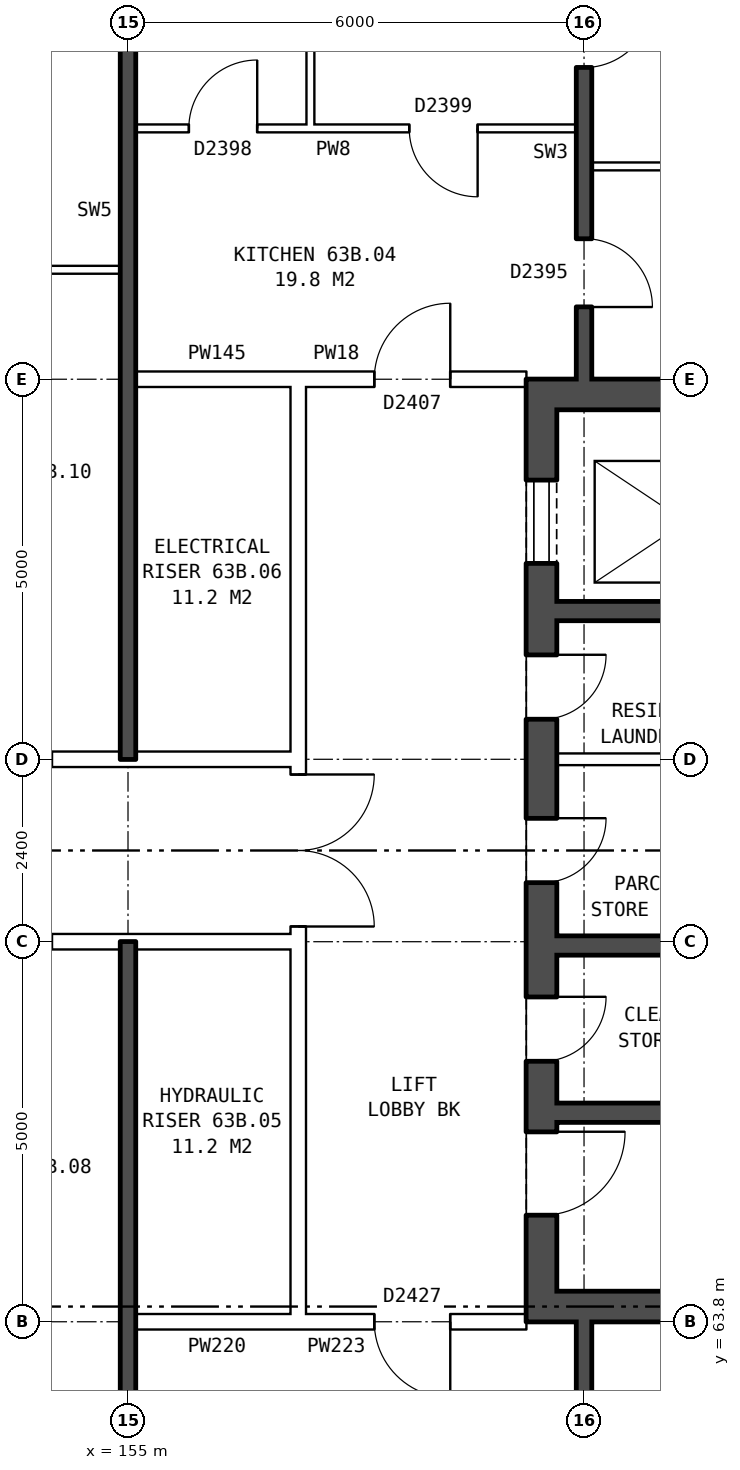
"""IFC4 building model, lengths in metres.
Left out: names, types, materials, properties, quantities, classifications, styles, units other than length and angle.
Written with IfcOpenShell. Run it as: python <this file> out.ifc"""

import sys

from ifc_helpers import new_model, si_unit, direction, frame, frame_2d, origin, place, context, subcontext, project, spatial, rectangle, extrude, element, fill, save


model = new_model("IFC4")
c1 = context("Model", 3, precision=1e-05, world=origin(), true_north=direction((0.0, 1.0)))
c2 = subcontext(c1, "Body", "Model", "MODEL_VIEW")
j1 = project(units=[si_unit("LENGTHUNIT", "METRE"), si_unit("PLANEANGLEUNIT", "RADIAN")], contexts=[c1])
p1 = place(None, origin())
s1 = spatial("IfcSite", under=j1, at=p1, CompositionType="ELEMENT")
p2 = place(p1, origin())
s2 = spatial("IfcBuilding", under=s1, at=p2, CompositionType="ELEMENT")
p3 = place(p2, frame((0.0, 0.0, 224.5)))
s3 = spatial("IfcBuildingStorey", under=s2, at=p3, CompositionType="ELEMENT", Elevation=224.5)
p4 = place(p3, frame((160.44, 76.2, 0.0), z_axis=(0.0, 0.0, 1.0), x_axis=(0.0, -1.0, 0.0)))
e1 = element("IfcWall", 1, at=p4, inside=s3, PredefinedType="SHEAR", context=c2, shape_type="SweptSolid", body=[
    extrude(rectangle(XDim=12.4, YDim=0.4, at=frame_2d((6.2, 0.0))), origin(), (0.0, 0.0, 1.0), 2.85),
])
p5 = place(p4, frame((1.325, 0.0, 0.0)))
e2 = element("IfcOpeningElement", 2, at=p5, cuts=e1, PredefinedType="OPENING", context=c2, shape_type="SweptSolid", body=[
    extrude(rectangle(XDim=1.1, YDim=2.1, at=frame_2d((0.55, 1.05))), frame((0.0, 0.21, 0.0), z_axis=(0.0, -1.0, 0.0), x_axis=(1.0, 0.0, 0.0)), (0.0, 0.0, 1.0), 0.42),
])
p6 = place(p4, frame((3.625, 0.0, 0.0)))
e3 = element("IfcOpeningElement", 3, at=p6, cuts=e1, PredefinedType="OPENING", context=c2, shape_type="SweptSolid", body=[
    extrude(rectangle(XDim=0.85, YDim=2.1, at=frame_2d((0.425, 1.05))), frame((0.0, 0.21, 0.0), z_axis=(0.0, -1.0, 0.0), x_axis=(1.0, 0.0, 0.0)), (0.0, 0.0, 1.0), 0.42),
])
p7 = place(p4, frame((5.775, 0.0, 0.0)))
e4 = element("IfcOpeningElement", 4, at=p7, cuts=e1, PredefinedType="OPENING", context=c2, shape_type="SweptSolid", body=[
    extrude(rectangle(XDim=0.85, YDim=2.1, at=frame_2d((0.425, 1.05))), frame((0.0, 0.21, 0.0), z_axis=(0.0, -1.0, 0.0), x_axis=(1.0, 0.0, 0.0)), (0.0, 0.0, 1.0), 0.42),
])
p8 = place(p4, frame((9.9, 0.0, 0.0)))
e5 = element("IfcOpeningElement", 5, at=p8, cuts=e1, PredefinedType="OPENING", context=c2, shape_type="SweptSolid", body=[
    extrude(rectangle(XDim=1.1, YDim=2.1, at=frame_2d((0.55, 1.05))), frame((0.0, 0.21, 0.0), z_axis=(0.0, -1.0, 0.0), x_axis=(1.0, 0.0, 0.0)), (0.0, 0.0, 1.0), 0.42),
])
p9 = place(p4, frame((8.125, 0.0, 0.0)))
e6 = element("IfcOpeningElement", 6, at=p9, cuts=e1, PredefinedType="OPENING", context=c2, shape_type="SweptSolid", body=[
    extrude(rectangle(XDim=0.85, YDim=2.1, at=frame_2d((0.425, 1.05))), frame((0.0, 0.21, 0.0), z_axis=(0.0, -1.0, 0.0), x_axis=(1.0, 0.0, 0.0)), (0.0, 0.0, 1.0), 0.42),
])
for number, where, z_axis, x_axis in (
    (7, (160.64, 76.0, 0.0), (0.0, 0.0, 1.0), (1.0, 0.0, 0.0)),
    (8, (160.64, 64.0, 0.0), (0.0, 0.0, 1.0), (1.0, 0.0, 0.0)),
):
    element("IfcWall", number, at=place(p3, frame(where, z_axis=z_axis, x_axis=x_axis)), inside=s3, PredefinedType="SHEAR", context=c2, shape_type="SweptSolid", body=[
        extrude(rectangle(XDim=7.6, YDim=0.4, at=frame_2d((3.8, 0.0))), origin(), (0.0, 0.0, 1.0), 2.85),
    ])
p10 = place(p3, frame((160.64, 73.15, 0.0), z_axis=(0.0, 0.0, 1.0), x_axis=(1.0, 0.0, 0.0)))
e9 = element("IfcWall", 9, at=p10, inside=s3, PredefinedType="SHEAR", context=c2, shape_type="SweptSolid", body=[
    extrude(rectangle(XDim=4.775, YDim=0.25, at=frame_2d((2.388, 0.0))), origin(), (0.0, 0.0, 1.0), 2.85),
])
p11 = place(p3, frame((160.64, 71.2, 0.0), z_axis=(0.0, 0.0, 1.0), x_axis=(1.0, 0.0, 0.0)))
e10 = element("IfcWall", 10, at=p11, inside=s3, PredefinedType="PARTITIONING", context=c2, shape_type="SweptSolid", body=[
    extrude(rectangle(XDim=2.525, YDim=0.15, at=frame_2d((1.263, 0.0))), origin(), (0.0, 0.0, 1.0), 2.85),
])
p12 = place(p3, frame((160.64, 68.75, 0.0), z_axis=(0.0, 0.0, 1.0), x_axis=(1.0, 0.0, 0.0)))
e11 = element("IfcWall", 11, at=p12, inside=s3, PredefinedType="SHEAR", context=c2, shape_type="SweptSolid", body=[
    extrude(rectangle(XDim=7.6, YDim=0.25, at=frame_2d((3.8, 0.0))), origin(), (0.0, 0.0, 1.0), 2.85),
])
p13 = place(p12, frame((5.175, 0.0, 0.0)))
e12 = element("IfcOpeningElement", 12, at=p13, cuts=e11, PredefinedType="OPENING", context=c2, shape_type="SweptSolid", body=[
    extrude(rectangle(XDim=1.1, YDim=2.1, at=frame_2d((0.55, 1.05))), frame((0.0, 0.135, 0.0), z_axis=(0.0, -1.0, 0.0), x_axis=(1.0, 0.0, 0.0)), (0.0, 0.0, 1.0), 0.27),
])
p14 = place(p12, frame((3.35, 0.0, 0.0)))
e13 = element("IfcOpeningElement", 13, at=p14, cuts=e11, PredefinedType="OPENING", context=c2, shape_type="SweptSolid", body=[
    extrude(rectangle(XDim=0.85, YDim=2.1, at=frame_2d((0.425, 1.05))), frame((0.0, 0.135, 0.0), z_axis=(0.0, -1.0, 0.0), x_axis=(1.0, 0.0, 0.0)), (0.0, 0.0, 1.0), 0.27),
])
p15 = place(p3, frame((160.64, 66.55, 0.0), z_axis=(0.0, 0.0, 1.0), x_axis=(1.0, 0.0, 0.0)))
e14 = element("IfcWall", 14, at=p15, inside=s3, PredefinedType="SHEAR", context=c2, shape_type="SweptSolid", body=[
    extrude(rectangle(XDim=2.525, YDim=0.25, at=frame_2d((1.263, 0.0))), origin(), (0.0, 0.0, 1.0), 2.85),
])
p16 = place(p3, frame((157.24, 63.9, 0.0), z_axis=(0.0, 0.0, 1.0), x_axis=(0.0, 1.0, 0.0)))
e15 = element("IfcWall", 15, at=p16, inside=s3, PredefinedType="PARTITIONING", context=c2, shape_type="SweptSolid", body=[
    extrude(rectangle(XDim=12.2, YDim=0.2, at=frame_2d((6.1, 0.0))), origin(), (0.0, 0.0, 1.0), 2.85),
])
p17 = place(p16, frame((5.1, 0.0, 0.0)))
e16 = element("IfcOpeningElement", 16, at=p17, cuts=e15, PredefinedType="OPENING", context=c2, shape_type="SweptSolid", body=[
    extrude(rectangle(XDim=2.0, YDim=2.1, at=frame_2d((1.0, 1.05))), frame((0.0, 0.11, 0.0), z_axis=(0.0, -1.0, 0.0), x_axis=(1.0, 0.0, 0.0)), (0.0, 0.0, 1.0), 0.22),
])
p18 = place(p3, frame((155.1, 63.8, 0.0), z_axis=(0.0, 0.0, 1.0), x_axis=(1.0, 0.0, 0.0)))
e17 = element("IfcWall", 17, at=p18, inside=s3, PredefinedType="PARTITIONING", context=c2, shape_type="SweptSolid", body=[
    extrude(rectangle(XDim=2.14, YDim=0.2, at=frame_2d((1.07, 0.0))), origin(), (0.0, 0.0, 1.0), 2.85),
])
p19 = place(p3, frame((157.24, 63.8, 0.0), z_axis=(0.0, 0.0, 1.0), x_axis=(1.0, 0.0, 0.0)))
e18 = element("IfcWall", 18, at=p19, inside=s3, PredefinedType="PARTITIONING", context=c2, shape_type="SweptSolid", body=[
    extrude(rectangle(XDim=3.0, YDim=0.2, at=frame_2d((1.5, 0.0))), origin(), (0.0, 0.0, 1.0), 2.85),
])
p20 = place(p19, frame((1.0, 0.0, 0.0)))
e19 = element("IfcOpeningElement", 19, at=p20, cuts=e18, PredefinedType="OPENING", context=c2, shape_type="SweptSolid", body=[
    extrude(rectangle(XDim=1.0, YDim=2.1, at=frame_2d((0.5, 1.05))), frame((0.0, 0.11, 0.0), z_axis=(0.0, -1.0, 0.0), x_axis=(1.0, 0.0, 0.0)), (0.0, 0.0, 1.0), 0.22),
])
p21 = place(p3, frame((142.76, 68.8, 0.0), z_axis=(0.0, 0.0, 1.0), x_axis=(1.0, 0.0, 0.0)))
e20 = element("IfcWall", 20, at=p21, inside=s3, PredefinedType="PARTITIONING", context=c2, shape_type="SweptSolid", body=[
    extrude(rectangle(XDim=14.48, YDim=0.2, at=frame_2d((7.24, 0.0))), origin(), (0.0, 0.0, 1.0), 2.85),
])
p22 = place(p21, frame((1.12, 0.0, 0.0)))
e21 = element("IfcOpeningElement", 21, at=p22, cuts=e20, PredefinedType="OPENING", context=c2, shape_type="SweptSolid", body=[
    extrude(rectangle(XDim=1.0, YDim=2.1, at=frame_2d((0.5, 1.05))), frame((0.0, 0.11, 0.0), z_axis=(0.0, -1.0, 0.0), x_axis=(1.0, 0.0, 0.0)), (0.0, 0.0, 1.0), 0.22),
])
p23 = place(p21, frame((10.24, 0.0, 0.0)))
e22 = element("IfcOpeningElement", 22, at=p23, cuts=e20, PredefinedType="OPENING", context=c2, shape_type="SweptSolid", body=[
    extrude(rectangle(XDim=1.0, YDim=2.1, at=frame_2d((0.5, 1.05))), frame((0.0, 0.11, 0.0), z_axis=(0.0, -1.0, 0.0), x_axis=(1.0, 0.0, 0.0)), (0.0, 0.0, 1.0), 0.22),
])
p24 = place(p3, frame((142.76, 71.2, 0.0), z_axis=(0.0, 0.0, 1.0), x_axis=(1.0, 0.0, 0.0)))
e23 = element("IfcWall", 23, at=p24, inside=s3, PredefinedType="PARTITIONING", context=c2, shape_type="SweptSolid", body=[
    extrude(rectangle(XDim=14.48, YDim=0.2, at=frame_2d((7.24, 0.0))), origin(), (0.0, 0.0, 1.0), 2.85),
])
p25 = place(p24, frame((4.24, 0.0, 0.0)))
e24 = element("IfcOpeningElement", 24, at=p25, cuts=e23, PredefinedType="OPENING", context=c2, shape_type="SweptSolid", body=[
    extrude(rectangle(XDim=1.0, YDim=2.1, at=frame_2d((0.5, 1.05))), frame((0.0, 0.11, 0.0), z_axis=(0.0, -1.0, 0.0), x_axis=(1.0, 0.0, 0.0)), (0.0, 0.0, 1.0), 0.22),
])
p26 = place(p24, frame((10.24, 0.0, 0.0)))
e25 = element("IfcOpeningElement", 25, at=p26, cuts=e23, PredefinedType="OPENING", context=c2, shape_type="SweptSolid", body=[
    extrude(rectangle(XDim=1.0, YDim=2.1, at=frame_2d((0.5, 1.05))), frame((0.0, 0.11, 0.0), z_axis=(0.0, -1.0, 0.0), x_axis=(1.0, 0.0, 0.0)), (0.0, 0.0, 1.0), 0.22),
])
p27 = place(p3, frame((155.1, 76.2, 0.0), z_axis=(0.0, 0.0, 1.0), x_axis=(1.0, 0.0, 0.0)))
e26 = element("IfcWall", 26, at=p27, inside=s3, PredefinedType="PARTITIONING", context=c2, shape_type="SweptSolid", body=[
    extrude(rectangle(XDim=2.14, YDim=0.2, at=frame_2d((1.07, 0.0))), origin(), (0.0, 0.0, 1.0), 2.85),
])
p28 = place(p3, frame((157.24, 76.2, 0.0), z_axis=(0.0, 0.0, 1.0), x_axis=(1.0, 0.0, 0.0)))
e27 = element("IfcWall", 27, at=p28, inside=s3, PredefinedType="PARTITIONING", context=c2, shape_type="SweptSolid", body=[
    extrude(rectangle(XDim=3.0, YDim=0.2, at=frame_2d((1.5, 0.0))), origin(), (0.0, 0.0, 1.0), 2.85),
])
p29 = place(p28, frame((1.0, 0.0, 0.0)))
e28 = element("IfcOpeningElement", 28, at=p29, cuts=e27, PredefinedType="OPENING", context=c2, shape_type="SweptSolid", body=[
    extrude(rectangle(XDim=1.0, YDim=2.1, at=frame_2d((0.5, 1.05))), frame((0.0, 0.11, 0.0), z_axis=(0.0, -1.0, 0.0), x_axis=(1.0, 0.0, 0.0)), (0.0, 0.0, 1.0), 0.22),
])
p30 = place(p3, frame((152.0, 77.64, 0.0), z_axis=(0.0, 0.0, 1.0), x_axis=(1.0, 0.0, 0.0)))
e29 = element("IfcWall", 29, at=p30, inside=s3, PredefinedType="PARTITIONING", context=c2, shape_type="SweptSolid", body=[
    extrude(rectangle(XDim=2.9, YDim=0.1, at=frame_2d((1.45, 0.0))), origin(), (0.0, 0.0, 1.0), 2.85),
])
p31 = place(p30, frame((1.0, 0.0, 0.0)))
e30 = element("IfcOpeningElement", 30, at=p31, cuts=e29, PredefinedType="OPENING", context=c2, shape_type="SweptSolid", body=[
    extrude(rectangle(XDim=0.9, YDim=2.1, at=frame_2d((0.45, 1.05))), frame((0.0, 0.06, 0.0), z_axis=(0.0, -1.0, 0.0), x_axis=(1.0, 0.0, 0.0)), (0.0, 0.0, 1.0), 0.12),
])
p32 = place(p3, frame((161.1, 79.0, 0.0), z_axis=(0.0, 0.0, 1.0), x_axis=(1.0, 0.0, 0.0)))
e31 = element("IfcWall", 31, at=p32, inside=s3, PredefinedType="PARTITIONING", context=c2, shape_type="SweptSolid", body=[
    extrude(rectangle(XDim=7.54, YDim=0.1, at=frame_2d((3.77, 0.0))), origin(), (0.0, 0.0, 1.0), 2.85),
])
p33 = place(p3, frame((155.1, 79.5, 0.0), z_axis=(0.0, 0.0, 1.0), x_axis=(1.0, 0.0, 0.0)))
e32 = element("IfcWall", 32, at=p33, inside=s3, PredefinedType="PARTITIONING", context=c2, shape_type="SweptSolid", body=[
    extrude(rectangle(XDim=5.8, YDim=0.1, at=frame_2d((2.9, 0.0))), origin(), (0.0, 0.0, 1.0), 2.85),
])
p34 = place(p33, frame((3.6, 0.0, 0.0)))
e33 = element("IfcOpeningElement", 33, at=p34, cuts=e32, PredefinedType="OPENING", context=c2, shape_type="SweptSolid", body=[
    extrude(rectangle(XDim=0.9, YDim=2.1, at=frame_2d((0.45, 1.05))), frame((0.0, 0.06, 0.0), z_axis=(0.0, -1.0, 0.0), x_axis=(1.0, 0.0, 0.0)), (0.0, 0.0, 1.0), 0.12),
])
p35 = place(p33, frame((0.7, 0.0, 0.0)))
e34 = element("IfcOpeningElement", 34, at=p35, cuts=e32, PredefinedType="OPENING", context=c2, shape_type="SweptSolid", body=[
    extrude(rectangle(XDim=0.9, YDim=2.1, at=frame_2d((0.45, 1.05))), frame((0.0, 0.06, 0.0), z_axis=(0.0, -1.0, 0.0), x_axis=(1.0, 0.0, 0.0)), (0.0, 0.0, 1.0), 0.12),
])
for number, where, z_axis, x_axis in (
    (35, (155.0, 54.36, 0.0), (0.0, 0.0, 1.0), (0.0, 1.0, 0.0)),
    (36, (155.0, 71.2, 0.0), (0.0, 0.0, 1.0), (0.0, 1.0, 0.0)),
):
    element("IfcWall", number, at=place(p3, frame(where, z_axis=z_axis, x_axis=x_axis)), inside=s3, PredefinedType="SOLIDWALL", context=c2, shape_type="SweptSolid", body=[
        extrude(rectangle(XDim=14.44, YDim=0.2, at=frame_2d((7.22, 0.0))), origin(), (0.0, 0.0, 1.0), 2.85),
    ])
p36 = place(p3, frame((157.4, 79.55, 0.0), z_axis=(0.0, 0.0, 1.0), x_axis=(0.0, 1.0, 0.0)))
e37 = element("IfcWall", 37, at=p36, inside=s3, PredefinedType="PARTITIONING", context=c2, shape_type="SweptSolid", body=[
    extrude(rectangle(XDim=2.7, YDim=0.1, at=frame_2d((1.35, 0.0))), origin(), (0.0, 0.0, 1.0), 2.85),
])
p37 = place(p3, frame((161.0, 54.36, 0.0), z_axis=(0.0, 0.0, 1.0), x_axis=(0.0, 1.0, 0.0)))
e38 = element("IfcWall", 38, at=p37, inside=s3, PredefinedType="SOLIDWALL", context=c2, shape_type="SweptSolid", body=[
    extrude(rectangle(XDim=9.44, YDim=0.2, at=frame_2d((4.72, 0.0))), origin(), (0.0, 0.0, 1.0), 2.85),
])
p38 = place(p37, frame((1.37, 0.0, 0.0)))
e39 = element("IfcOpeningElement", 39, at=p38, cuts=e38, PredefinedType="OPENING", context=c2, shape_type="SweptSolid", body=[
    extrude(rectangle(XDim=0.9, YDim=2.1, at=frame_2d((0.45, 1.05))), frame((0.0, 0.11, 0.0), z_axis=(0.0, -1.0, 0.0), x_axis=(1.0, 0.0, 0.0)), (0.0, 0.0, 1.0), 0.22),
])
p39 = place(p37, frame((4.14, 0.0, 0.0)))
e40 = element("IfcOpeningElement", 40, at=p39, cuts=e38, PredefinedType="OPENING", context=c2, shape_type="SweptSolid", body=[
    extrude(rectangle(XDim=0.9, YDim=2.1, at=frame_2d((0.45, 1.05))), frame((0.0, 0.11, 0.0), z_axis=(0.0, -1.0, 0.0), x_axis=(1.0, 0.0, 0.0)), (0.0, 0.0, 1.0), 0.22),
])
p40 = place(p37, frame((7.59, 0.0, 0.0)))
e41 = element("IfcOpeningElement", 41, at=p40, cuts=e38, PredefinedType="OPENING", context=c2, shape_type="SweptSolid", body=[
    extrude(rectangle(XDim=0.9, YDim=2.1, at=frame_2d((0.45, 1.05))), frame((0.0, 0.11, 0.0), z_axis=(0.0, -1.0, 0.0), x_axis=(1.0, 0.0, 0.0)), (0.0, 0.0, 1.0), 0.22),
])
p41 = place(p3, frame((161.0, 76.2, 0.0), z_axis=(0.0, 0.0, 1.0), x_axis=(0.0, 1.0, 0.0)))
e42 = element("IfcWall", 42, at=p41, inside=s3, PredefinedType="SOLIDWALL", context=c2, shape_type="SweptSolid", body=[
    extrude(rectangle(XDim=9.44, YDim=0.2, at=frame_2d((4.72, 0.0))), origin(), (0.0, 0.0, 1.0), 2.85),
])
p42 = place(p41, frame((7.17, 0.0, 0.0)))
e43 = element("IfcOpeningElement", 43, at=p42, cuts=e42, PredefinedType="OPENING", context=c2, shape_type="SweptSolid", body=[
    extrude(rectangle(XDim=0.9, YDim=2.1, at=frame_2d((0.45, 1.05))), frame((0.0, 0.11, 0.0), z_axis=(0.0, -1.0, 0.0), x_axis=(1.0, 0.0, 0.0)), (0.0, 0.0, 1.0), 0.22),
])
p43 = place(p41, frame((4.1, 0.0, 0.0)))
e44 = element("IfcOpeningElement", 44, at=p43, cuts=e42, PredefinedType="OPENING", context=c2, shape_type="SweptSolid", body=[
    extrude(rectangle(XDim=0.9, YDim=2.1, at=frame_2d((0.45, 1.05))), frame((0.0, 0.11, 0.0), z_axis=(0.0, -1.0, 0.0), x_axis=(1.0, 0.0, 0.0)), (0.0, 0.0, 1.0), 0.22),
])
p44 = place(p41, frame((0.95, 0.0, 0.0)))
e45 = element("IfcOpeningElement", 45, at=p44, cuts=e42, PredefinedType="OPENING", context=c2, shape_type="SweptSolid", body=[
    extrude(rectangle(XDim=0.9, YDim=2.1, at=frame_2d((0.45, 1.05))), frame((0.0, 0.11, 0.0), z_axis=(0.0, -1.0, 0.0), x_axis=(1.0, 0.0, 0.0)), (0.0, 0.0, 1.0), 0.22),
])
p45 = place(p5, origin())
e46 = element("IfcDoor", 46, at=p45, inside=s3, OperationType="DOUBLE_DOOR_SLIDING", PredefinedType="DOOR", context=c2, shape_type="SweptSolid", body=[
    extrude(rectangle(XDim=1.1, YDim=2.1, at=frame_2d((0.55, 1.05))), frame((0.0, 0.185, 0.0), z_axis=(0.0, -1.0, 0.0), x_axis=(1.0, 0.0, 0.0)), (0.0, 0.0, 1.0), 0.05),
])
fill(e2, e46)
p46 = place(p6, origin())
e47 = element("IfcDoor", 47, at=p46, inside=s3, OperationType="SINGLE_SWING_LEFT", PredefinedType="DOOR", context=c2, shape_type="SweptSolid", body=[
    extrude(rectangle(XDim=0.85, YDim=2.1, at=frame_2d((0.425, 1.05))), frame((0.0, 0.185, 0.0), z_axis=(0.0, -1.0, 0.0), x_axis=(1.0, 0.0, 0.0)), (0.0, 0.0, 1.0), 0.05),
])
fill(e3, e47)
p47 = place(p7, origin())
e48 = element("IfcDoor", 48, at=p47, inside=s3, OperationType="SINGLE_SWING_LEFT", PredefinedType="DOOR", context=c2, shape_type="SweptSolid", body=[
    extrude(rectangle(XDim=0.85, YDim=2.1, at=frame_2d((0.425, 1.05))), frame((0.0, 0.185, 0.0), z_axis=(0.0, -1.0, 0.0), x_axis=(1.0, 0.0, 0.0)), (0.0, 0.0, 1.0), 0.05),
])
fill(e4, e48)
p48 = place(p8, origin())
e49 = element("IfcDoor", 49, at=p48, inside=s3, OperationType="SINGLE_SWING_LEFT", PredefinedType="DOOR", context=c2, shape_type="SweptSolid", body=[
    extrude(rectangle(XDim=1.1, YDim=2.1, at=frame_2d((0.55, 1.05))), frame((0.0, 0.185, 0.0), z_axis=(0.0, -1.0, 0.0), x_axis=(1.0, 0.0, 0.0)), (0.0, 0.0, 1.0), 0.05),
])
fill(e5, e49)
p49 = place(p9, origin())
e50 = element("IfcDoor", 50, at=p49, inside=s3, OperationType="SINGLE_SWING_LEFT", PredefinedType="DOOR", context=c2, shape_type="SweptSolid", body=[
    extrude(rectangle(XDim=0.85, YDim=2.1, at=frame_2d((0.425, 1.05))), frame((0.0, 0.185, 0.0), z_axis=(0.0, -1.0, 0.0), x_axis=(1.0, 0.0, 0.0)), (0.0, 0.0, 1.0), 0.05),
])
fill(e6, e50)
p50 = place(p17, frame((2.0, 0.0, 0.0), z_axis=(0.0, 0.0, 1.0), x_axis=(-1.0, 0.0, 0.0)))
e51 = element("IfcDoor", 51, at=p50, inside=s3, OperationType="DOUBLE_DOOR_SINGLE_SWING", PredefinedType="DOOR", context=c2, shape_type="SweptSolid", body=[
    extrude(rectangle(XDim=2.0, YDim=2.1, at=frame_2d((1.0, 1.05))), frame((0.0, 0.025, 0.0), z_axis=(0.0, -1.0, 0.0), x_axis=(1.0, 0.0, 0.0)), (0.0, 0.0, 1.0), 0.05),
])
fill(e16, e51)
p51 = place(p20, frame((1.0, 0.0, 0.0), z_axis=(0.0, 0.0, 1.0), x_axis=(-1.0, 0.0, 0.0)))
e52 = element("IfcDoor", 52, at=p51, inside=s3, OperationType="SINGLE_SWING_LEFT", PredefinedType="DOOR", context=c2, shape_type="SweptSolid", body=[
    extrude(rectangle(XDim=1.0, YDim=2.1, at=frame_2d((0.5, 1.05))), frame((0.0, 0.025, 0.0), z_axis=(0.0, -1.0, 0.0), x_axis=(1.0, 0.0, 0.0)), (0.0, 0.0, 1.0), 0.05),
])
fill(e19, e52)
p52 = place(p43, frame((0.9, 0.0, 0.0), z_axis=(0.0, 0.0, 1.0), x_axis=(-1.0, 0.0, 0.0)))
e53 = element("IfcDoor", 53, at=p52, inside=s3, OperationType="SINGLE_SWING_LEFT", PredefinedType="DOOR", context=c2, shape_type="SweptSolid", body=[
    extrude(rectangle(XDim=0.9, YDim=2.1, at=frame_2d((0.45, 1.05))), frame((0.0, 0.025, 0.0), z_axis=(0.0, -1.0, 0.0), x_axis=(1.0, 0.0, 0.0)), (0.0, 0.0, 1.0), 0.05),
])
fill(e44, e53)
p53 = place(p44, frame((0.9, 0.0, 0.0), z_axis=(0.0, 0.0, 1.0), x_axis=(-1.0, 0.0, 0.0)))
e54 = element("IfcDoor", 54, at=p53, inside=s3, OperationType="SINGLE_SWING_RIGHT", PredefinedType="DOOR", context=c2, shape_type="SweptSolid", body=[
    extrude(rectangle(XDim=0.9, YDim=2.1, at=frame_2d((0.45, 1.05))), frame((0.0, 0.025, 0.0), z_axis=(0.0, -1.0, 0.0), x_axis=(1.0, 0.0, 0.0)), (0.0, 0.0, 1.0), 0.05),
])
fill(e45, e54)
p54 = place(p29, origin())
e55 = element("IfcDoor", 55, at=p54, inside=s3, OperationType="SINGLE_SWING_RIGHT", PredefinedType="DOOR", context=c2, shape_type="SweptSolid", body=[
    extrude(rectangle(XDim=1.0, YDim=2.1, at=frame_2d((0.5, 1.05))), frame((0.0, 0.025, 0.0), z_axis=(0.0, -1.0, 0.0), x_axis=(1.0, 0.0, 0.0)), (0.0, 0.0, 1.0), 0.05),
])
fill(e28, e55)
p55 = place(p34, frame((0.9, 0.0, 0.0), z_axis=(0.0, 0.0, 1.0), x_axis=(-1.0, 0.0, 0.0)))
e56 = element("IfcDoor", 56, at=p55, inside=s3, OperationType="SINGLE_SWING_LEFT", PredefinedType="DOOR", context=c2, shape_type="SweptSolid", body=[
    extrude(rectangle(XDim=0.9, YDim=2.1, at=frame_2d((0.45, 1.05))), frame((0.0, 0.025, 0.0), z_axis=(0.0, -1.0, 0.0), x_axis=(1.0, 0.0, 0.0)), (0.0, 0.0, 1.0), 0.05),
])
fill(e33, e56)
p56 = place(p35, origin())
e57 = element("IfcDoor", 57, at=p56, inside=s3, OperationType="SINGLE_SWING_RIGHT", PredefinedType="DOOR", context=c2, shape_type="SweptSolid", body=[
    extrude(rectangle(XDim=0.9, YDim=2.1, at=frame_2d((0.45, 1.05))), frame((0.0, 0.025, 0.0), z_axis=(0.0, -1.0, 0.0), x_axis=(1.0, 0.0, 0.0)), (0.0, 0.0, 1.0), 0.05),
])
fill(e34, e57)
save(model, sys.argv[1])
